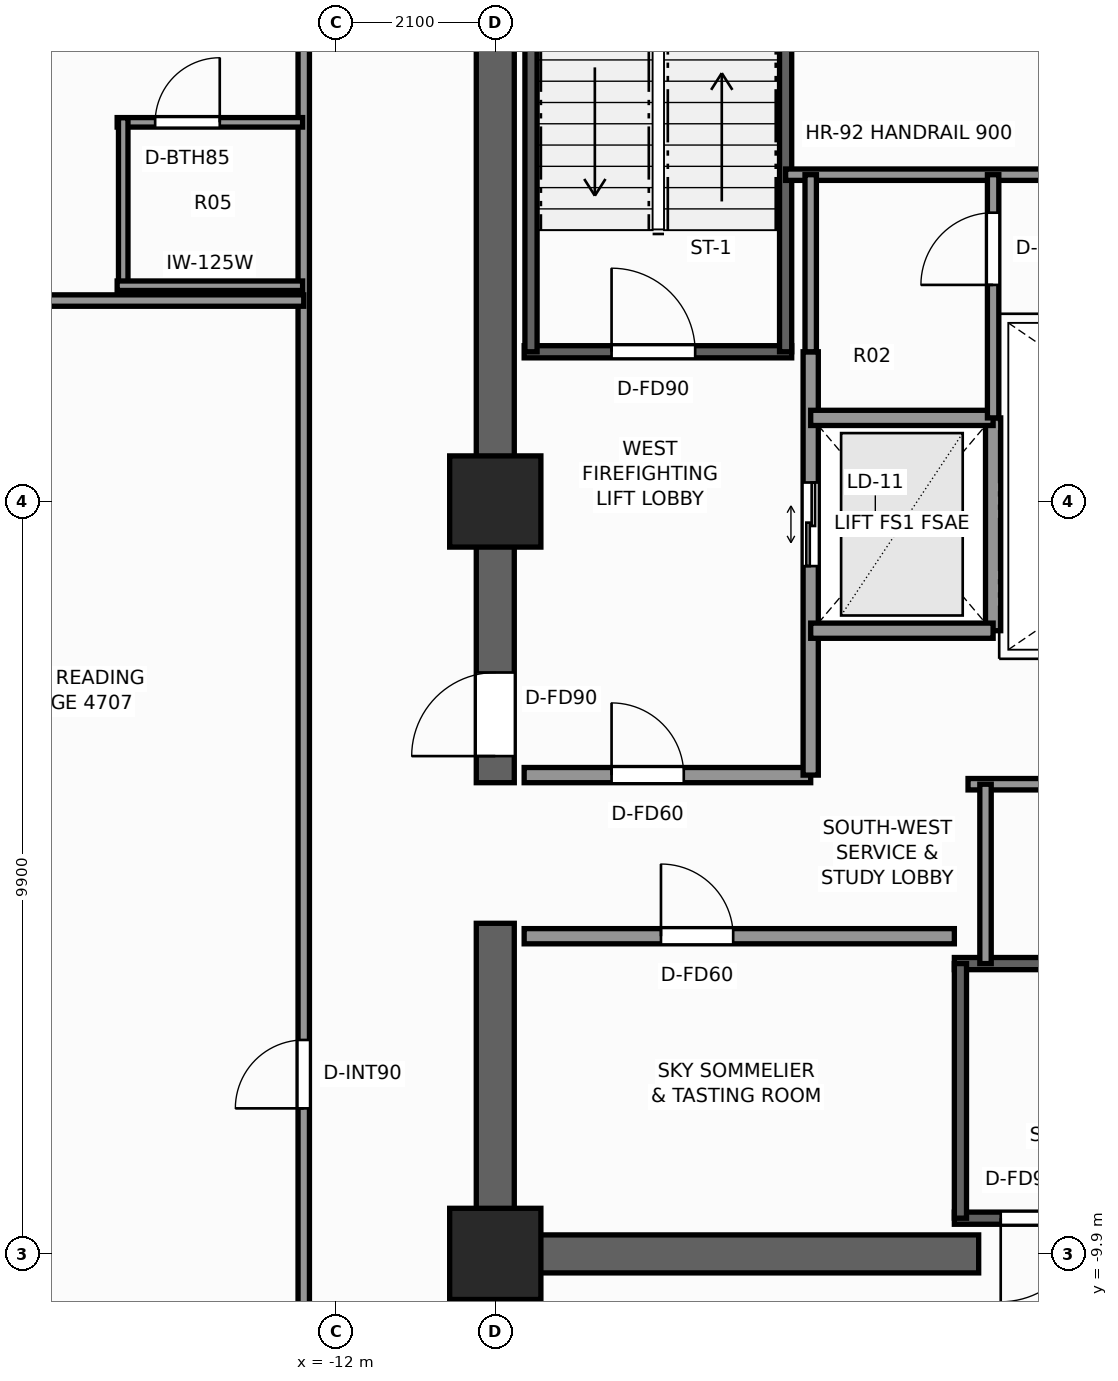
"""IFC4 building model, lengths in metres.
Left out: names, types, materials, properties, quantities, classifications, styles, units other than length and angle.
Written with IfcOpenShell. Run it as: python <this file> out.ifc"""

import sys

from ifc_helpers import new_model, si_unit, direction, frame, frame_2d, origin, origin_2d, place, context, subcontext, project, spatial, rectangle, extrude, element, fill, save


model = new_model("IFC4")
c1 = context("Model", 3, precision=1e-05, world=origin(), true_north=direction((0.0, 1.0)))
c2 = subcontext(c1, "Body", "Model", "MODEL_VIEW")
j1 = project(units=[si_unit("LENGTHUNIT", "METRE"), si_unit("PLANEANGLEUNIT", "RADIAN")], contexts=[c1])
p1 = place(None, origin())
s1 = spatial("IfcSite", under=j1, at=p1, CompositionType="ELEMENT")
p2 = place(p1, origin())
s2 = spatial("IfcBuilding", under=s1, at=p2, CompositionType="ELEMENT")
p3 = place(p2, frame((0.0, 0.0, 163.5)))
s3 = spatial("IfcBuildingStorey", under=s2, at=p3, CompositionType="ELEMENT", Elevation=163.5)
p4 = place(p3, frame((-3.54, -9.9, 0.0), z_axis=(0.0, 0.0, 1.0), x_axis=(-1.0, 0.0, 0.0)))
e1 = element("IfcWall", 1, at=p4, inside=s3, PredefinedType="SHEAR", context=c2, shape_type="SweptSolid", body=[
    extrude(rectangle(XDim=6.61, YDim=0.5, at=frame_2d((3.305, 0.0))), origin(), (0.0, 0.0, 1.0), 3.3),
])
p5 = place(p3, frame((-9.9, -9.65, 0.0), z_axis=(0.0, 0.0, 1.0), x_axis=(0.0, 1.0, 0.0)))
e2 = element("IfcWall", 2, at=p5, inside=s3, PredefinedType="SHEAR", context=c2, shape_type="SweptSolid", body=[
    extrude(rectangle(XDim=4.1, YDim=0.5, at=frame_2d((2.05, 0.0))), origin(), (0.0, 0.0, 1.0), 3.3),
])
p6 = place(p3, frame((-9.9, -3.7, 0.0), z_axis=(0.0, 0.0, 1.0), x_axis=(0.0, 1.0, 0.0)))
e3 = element("IfcWall", 3, at=p6, inside=s3, PredefinedType="SHEAR", context=c2, shape_type="SweptSolid", body=[
    extrude(rectangle(XDim=13.35, YDim=0.5, at=frame_2d((6.675, 0.0))), origin(), (0.0, 0.0, 1.0), 3.3),
])
p7 = place(p6, frame((0.35, 0.0, 0.0)))
e4 = element("IfcOpeningElement", 4, at=p7, cuts=e3, PredefinedType="OPENING", context=c2, shape_type="SweptSolid", body=[
    extrude(rectangle(XDim=1.1, YDim=2.2, at=frame_2d((0.55, 1.1))), frame((0.0, 0.26, 0.0), z_axis=(0.0, -1.0, 0.0), x_axis=(1.0, 0.0, 0.0)), (0.0, 0.0, 1.0), 0.52),
])
for number, where, z_axis, x_axis in (
    (5, (-9.9, -9.9, 0.0), (0.0, 0.0, 1.0), (1.0, 0.0, 0.0)),
    (6, (-9.9, 0.0, 0.0), (0.0, 0.0, 1.0), (1.0, 0.0, 0.0)),
):
    element("IfcColumn", number, at=place(p3, frame(where, z_axis=z_axis, x_axis=x_axis)), inside=s3, PredefinedType="COLUMN", context=c2, shape_type="SweptSolid", body=[
        extrude(rectangle(XDim=1.2, YDim=1.2, at=origin_2d()), origin(), (0.0, 0.0, 1.0), 3.3),
    ])
p8 = place(p3, frame((-9.52, 1.97, 0.0), z_axis=(0.0, 0.0, 1.0), x_axis=(1.0, 0.0, 0.0)))
e7 = element("IfcWall", 7, at=p8, inside=s3, PredefinedType="SHEAR", context=c2, shape_type="SweptSolid", body=[
    extrude(rectangle(XDim=3.52, YDim=0.16, at=frame_2d((1.76, 0.0))), origin(), (0.0, 0.0, 1.0), 3.3),
])
p9 = place(p8, frame((1.15, 0.0, 0.0)))
e8 = element("IfcOpeningElement", 8, at=p9, cuts=e7, PredefinedType="OPENING", context=c2, shape_type="SweptSolid", body=[
    extrude(rectangle(XDim=1.1, YDim=2.2, at=frame_2d((0.55, 1.1))), frame((0.0, 0.09, 0.0), z_axis=(0.0, -1.0, 0.0), x_axis=(1.0, 0.0, 0.0)), (0.0, 0.0, 1.0), 0.18),
])
for number, where, z_axis, x_axis in (
    (9, (-9.43, 1.97, 0.0), (0.0, 0.0, 1.0), (0.0, 1.0, 0.0)),
    (10, (-6.08, 1.97, 0.0), (0.0, 0.0, 1.0), (0.0, 1.0, 0.0)),
):
    element("IfcWall", number, at=place(p3, frame(where, z_axis=z_axis, x_axis=x_axis)), inside=s3, PredefinedType="SHEAR", context=c2, shape_type="SweptSolid", body=[
        extrude(rectangle(XDim=7.56, YDim=0.16, at=frame_2d((3.78, 0.0))), origin(), (0.0, 0.0, 1.0), 3.3),
    ])
p10 = place(p3, frame((3.86, -9.43, 0.0), z_axis=(0.0, 0.0, 1.0), x_axis=(-1.0, 0.0, 0.0)))
e11 = element("IfcWall", 11, at=p10, inside=s3, PredefinedType="SHEAR", context=c2, shape_type="SweptSolid", body=[
    extrude(rectangle(XDim=7.72, YDim=0.16, at=frame_2d((3.86, 0.0))), origin(), (0.0, 0.0, 1.0), 3.3),
])
p11 = place(p10, frame((6.01, 0.0, 0.0)))
e12 = element("IfcOpeningElement", 12, at=p11, cuts=e11, PredefinedType="OPENING", context=c2, shape_type="SweptSolid", body=[
    extrude(rectangle(XDim=1.1, YDim=2.2, at=frame_2d((0.55, 1.1))), frame((0.0, 0.09, 0.0), z_axis=(0.0, -1.0, 0.0), x_axis=(1.0, 0.0, 0.0)), (0.0, 0.0, 1.0), 0.18),
])
p12 = place(p3, frame((-3.86, -6.08, 0.0), z_axis=(0.0, 0.0, 1.0), x_axis=(1.0, 0.0, 0.0)))
e13 = element("IfcWall", 13, at=p12, inside=s3, PredefinedType="SHEAR", context=c2, shape_type="SweptSolid", body=[
    extrude(rectangle(XDim=7.72, YDim=0.16, at=frame_2d((3.86, 0.0))), origin(), (0.0, 0.0, 1.0), 3.3),
])
p13 = place(p3, frame((-3.78, -9.43, 0.0), z_axis=(0.0, 0.0, 1.0), x_axis=(0.0, 1.0, 0.0)))
e14 = element("IfcWall", 14, at=p13, inside=s3, PredefinedType="SHEAR", context=c2, shape_type="SweptSolid", body=[
    extrude(rectangle(XDim=3.35, YDim=0.16, at=frame_2d((1.675, 0.0))), origin(), (0.0, 0.0, 1.0), 3.3),
])
p14 = place(p3, frame((-9.52, -3.6, 0.0), z_axis=(0.0, 0.0, 1.0), x_axis=(1.0, 0.0, 0.0)))
e15 = element("IfcWall", 15, at=p14, inside=s3, PredefinedType="SOLIDWALL", context=c2, shape_type="SweptSolid", body=[
    extrude(rectangle(XDim=3.77, YDim=0.2, at=frame_2d((1.885, 0.0))), origin(), (0.0, 0.0, 1.0), 3.1),
])
p15 = place(p14, frame((1.15, 0.0, 0.0)))
e16 = element("IfcOpeningElement", 16, at=p15, cuts=e15, PredefinedType="OPENING", context=c2, shape_type="SweptSolid", body=[
    extrude(rectangle(XDim=0.95, YDim=2.06, at=frame_2d((0.475, 1.03))), frame((0.0, 0.11, 0.0), z_axis=(0.0, -1.0, 0.0), x_axis=(1.0, 0.0, 0.0)), (0.0, 0.0, 1.0), 0.22),
])
p16 = place(p3, frame((-5.75, -3.6, 0.0), z_axis=(0.0, 0.0, 1.0), x_axis=(0.0, 1.0, 0.0)))
e17 = element("IfcWall", 17, at=p16, inside=s3, PredefinedType="SOLIDWALL", context=c2, shape_type="SweptSolid", body=[
    extrude(rectangle(XDim=5.57, YDim=0.2, at=frame_2d((2.785, 0.0))), origin(), (0.0, 0.0, 1.0), 2.735),
])
p17 = place(p16, frame((2.75, 0.0, 0.0)))
e18 = element("IfcOpeningElement", 18, at=p17, cuts=e17, PredefinedType="OPENING", context=c2, shape_type="SweptSolid", body=[
    extrude(rectangle(XDim=1.1, YDim=2.2, at=frame_2d((0.55, 1.1))), frame((0.0, 0.11, 0.0), z_axis=(0.0, -1.0, 0.0), x_axis=(1.0, 0.0, 0.0)), (0.0, 0.0, 1.0), 0.22),
])
p18 = place(p3, frame((-3.35, -1.7, 0.0), z_axis=(0.0, 0.0, 1.0), x_axis=(0.0, 1.0, 0.0)))
e19 = element("IfcWall", 19, at=p18, inside=s3, PredefinedType="SOLIDWALL", context=c2, shape_type="SweptSolid", body=[
    extrude(rectangle(XDim=2.8, YDim=0.2, at=frame_2d((1.4, 0.0))), origin(), (0.0, 0.0, 1.0), 2.735),
])
for number, where, z_axis, x_axis in (
    (20, (-5.75, -1.7, 0.0), (0.0, 0.0, 1.0), (1.0, 0.0, 0.0)),
    (21, (-5.75, 1.1, 0.0), (0.0, 0.0, 1.0), (1.0, 0.0, 0.0)),
):
    element("IfcWall", number, at=place(p3, frame(where, z_axis=z_axis, x_axis=x_axis)), inside=s3, PredefinedType="SOLIDWALL", context=c2, shape_type="SweptSolid", body=[
        extrude(rectangle(XDim=2.4, YDim=0.2, at=frame_2d((1.2, 0.0))), origin(), (0.0, 0.0, 1.0), 3.1),
    ])
p19 = place(p3, frame((-6.08, 4.3, 0.0), z_axis=(0.0, 0.0, 1.0), x_axis=(1.0, 0.0, 0.0)))
e22 = element("IfcWall", 22, at=p19, inside=s3, PredefinedType="PARTITIONING", context=c2, shape_type="SweptSolid", body=[
    extrude(rectangle(XDim=6.3, YDim=0.15, at=frame_2d((3.15, 0.0))), origin(), (0.0, 0.0, 1.0), 3.1),
])
p20 = place(p3, frame((-9.52, -5.72, 0.0), z_axis=(0.0, 0.0, 1.0), x_axis=(1.0, 0.0, 0.0)))
e23 = element("IfcWall", 23, at=p20, inside=s3, PredefinedType="SOLIDWALL", context=c2, shape_type="SweptSolid", body=[
    extrude(rectangle(XDim=5.66, YDim=0.2, at=frame_2d((2.83, 0.0))), origin(), (0.0, 0.0, 1.0), 3.1),
])
p21 = place(p20, frame((1.8, 0.0, 0.0)))
e24 = element("IfcOpeningElement", 24, at=p21, cuts=e23, PredefinedType="OPENING", context=c2, shape_type="SweptSolid", body=[
    extrude(rectangle(XDim=0.95, YDim=2.06, at=frame_2d((0.475, 1.03))), frame((0.0, 0.11, 0.0), z_axis=(0.0, -1.0, 0.0), x_axis=(1.0, 0.0, 0.0)), (0.0, 0.0, 1.0), 0.22),
])
p22 = place(p3, frame((-3.68, -3.72, 0.0), z_axis=(0.0, 0.0, 1.0), x_axis=(1.0, 0.0, 0.0)))
e25 = element("IfcWall", 25, at=p22, inside=s3, PredefinedType="PARTITIONING", context=c2, shape_type="SweptSolid", body=[
    extrude(rectangle(XDim=7.36, YDim=0.15, at=frame_2d((3.68, 0.0))), origin(), (0.0, 0.0, 1.0), 3.1),
])
p23 = place(p3, frame((-3.45, -6.08, 0.0), z_axis=(0.0, 0.0, 1.0), x_axis=(0.0, 1.0, 0.0)))
e26 = element("IfcWall", 26, at=p23, inside=s3, PredefinedType="PARTITIONING", context=c2, shape_type="SweptSolid", body=[
    extrude(rectangle(XDim=2.36, YDim=0.15, at=frame_2d((1.18, 0.0))), origin(), (0.0, 0.0, 1.0), 3.1),
])
p24 = place(p3, frame((-3.35, 1.1, 0.0), z_axis=(0.0, 0.0, 1.0), x_axis=(0.0, 1.0, 0.0)))
e27 = element("IfcWall", 27, at=p24, inside=s3, PredefinedType="PARTITIONING", context=c2, shape_type="SweptSolid", body=[
    extrude(rectangle(XDim=3.2, YDim=0.15, at=frame_2d((1.6, 0.0))), origin(), (0.0, 0.0, 1.0), 2.735),
])
p25 = place(p24, frame((1.75, 0.0, 0.0)))
e28 = element("IfcOpeningElement", 28, at=p25, cuts=e27, PredefinedType="OPENING", context=c2, shape_type="SweptSolid", body=[
    extrude(rectangle(XDim=0.95, YDim=2.06, at=frame_2d((0.475, 1.03))), frame((0.0, 0.085, 0.0), z_axis=(0.0, -1.0, 0.0), x_axis=(1.0, 0.0, 0.0)), (0.0, 0.0, 1.0), 0.17),
])
p26 = place(p3, frame((-5.75, 1.97, 0.0), z_axis=(0.0, 0.0, 1.0), x_axis=(0.0, 1.0, 0.0)))
e29 = element("IfcWall", 29, at=p26, inside=s3, PredefinedType="PARTITIONING", context=c2, shape_type="SweptSolid", body=[
    extrude(rectangle(XDim=2.33, YDim=0.15, at=frame_2d((1.165, 0.0))), origin(), (0.0, 0.0, 1.0), 2.735),
])
p27 = place(p3, frame((-12.42, -12.58, 0.0), z_axis=(0.0, 0.0, 1.0), x_axis=(0.0, 1.0, 0.0)))
e30 = element("IfcWall", 30, at=p27, inside=s3, PredefinedType="PARTITIONING", context=c2, shape_type="SweptSolid", body=[
    extrude(rectangle(XDim=24.84, YDim=0.15, at=frame_2d((12.42, 0.0))), origin(), (0.0, 0.0, 1.0), 2.389),
])
p28 = place(p27, frame((4.595, 0.0, 0.0)))
e31 = element("IfcOpeningElement", 31, at=p28, cuts=e30, PredefinedType="OPENING", context=c2, shape_type="SweptSolid", body=[
    extrude(rectangle(XDim=0.9, YDim=2.06, at=frame_2d((0.45, 1.03))), frame((0.0, 0.085, 0.0), z_axis=(0.0, -1.0, 0.0), x_axis=(1.0, 0.0, 0.0)), (0.0, 0.0, 1.0), 0.17),
])
p29 = place(p27, frame((19.64, 0.0, 0.0)))
e32 = element("IfcOpeningElement", 32, at=p29, cuts=e30, PredefinedType="OPENING", context=c2, shape_type="SweptSolid", body=[
    extrude(rectangle(XDim=0.95, YDim=2.06, at=frame_2d((0.475, 1.03))), frame((0.0, 0.085, 0.0), z_axis=(0.0, -1.0, 0.0), x_axis=(1.0, 0.0, 0.0)), (0.0, 0.0, 1.0), 0.17),
])
p30 = place(p3, frame((-19.08, 2.644, 0.0), z_axis=(0.0, 0.0, 1.0), x_axis=(1.0, 0.0, 0.0)))
e33 = element("IfcWall", 33, at=p30, inside=s3, PredefinedType="PARTITIONING", context=c2, shape_type="SweptSolid", body=[
    extrude(rectangle(XDim=6.66, YDim=0.15, at=frame_2d((3.33, 0.0))), origin(), (0.0, 0.0, 1.0), 2.473),
])
p31 = place(p3, frame((-14.875, 4.989, 0.0), z_axis=(0.0, 0.0, 1.0), x_axis=(1.0, 0.0, 0.0)))
e34 = element("IfcWall", 34, at=p31, inside=s3, PredefinedType="PARTITIONING", context=c2, shape_type="SweptSolid", body=[
    extrude(rectangle(XDim=2.44, YDim=0.125, at=frame_2d((1.22, 0.0))), origin(), (0.0, 0.0, 1.0), 3.1),
])
p32 = place(p31, frame((0.5, 0.0, 0.0)))
e35 = element("IfcOpeningElement", 35, at=p32, cuts=e34, PredefinedType="OPENING", context=c2, shape_type="SweptSolid", body=[
    extrude(rectangle(XDim=0.85, YDim=2.03, at=frame_2d((0.425, 1.015))), frame((0.0, 0.073, 0.0), z_axis=(0.0, -1.0, 0.0), x_axis=(1.0, 0.0, 0.0)), (0.0, 0.0, 1.0), 0.145),
])
p33 = place(p3, frame((-14.795, 2.779, 0.0), z_axis=(0.0, 0.0, 1.0), x_axis=(0.0, 1.0, 0.0)))
e36 = element("IfcWall", 36, at=p33, inside=s3, PredefinedType="PARTITIONING", context=c2, shape_type="SweptSolid", body=[
    extrude(rectangle(XDim=2.27, YDim=0.125, at=frame_2d((1.135, 0.0))), origin(), (0.0, 0.0, 1.0), 2.389),
])
p34 = place(p3, frame((-14.875, 2.839, 0.0), z_axis=(0.0, 0.0, 1.0), x_axis=(1.0, 0.0, 0.0)))
e37 = element("IfcWall", 37, at=p34, inside=s3, PredefinedType="PARTITIONING", context=c2, shape_type="SweptSolid", body=[
    extrude(rectangle(XDim=2.44, YDim=0.125, at=frame_2d((1.22, 0.0))), origin(), (0.0, 0.0, 1.0), 3.1),
])
p35 = place(p9, origin())
e38 = element("IfcDoor", 38, at=p35, inside=s3, OperationType="SINGLE_SWING_LEFT", PredefinedType="DOOR", context=c2, shape_type="SweptSolid", body=[
    extrude(rectangle(XDim=1.1, YDim=2.2, at=frame_2d((0.55, 1.1))), frame((0.0, 0.025, 0.0), z_axis=(0.0, -1.0, 0.0), x_axis=(1.0, 0.0, 0.0)), (0.0, 0.0, 1.0), 0.05),
])
fill(e8, e38)
p36 = place(p11, origin())
e39 = element("IfcDoor", 39, at=p36, inside=s3, OperationType="SINGLE_SWING_RIGHT", PredefinedType="DOOR", context=c2, shape_type="SweptSolid", body=[
    extrude(rectangle(XDim=1.1, YDim=2.2, at=frame_2d((0.55, 1.1))), frame((0.0, 0.025, 0.0), z_axis=(0.0, -1.0, 0.0), x_axis=(1.0, 0.0, 0.0)), (0.0, 0.0, 1.0), 0.05),
])
fill(e12, e39)
p37 = place(p7, origin())
e40 = element("IfcDoor", 40, at=p37, inside=s3, OperationType="SINGLE_SWING_LEFT", PredefinedType="DOOR", context=c2, shape_type="SweptSolid", body=[
    extrude(rectangle(XDim=1.1, YDim=2.2, at=frame_2d((0.55, 1.1))), frame((0.0, 0.025, 0.0), z_axis=(0.0, -1.0, 0.0), x_axis=(1.0, 0.0, 0.0)), (0.0, 0.0, 1.0), 0.05),
])
fill(e4, e40)
p38 = place(p17, origin())
e41 = element("IfcDoor", 41, at=p38, inside=s3, OperationType="DOUBLE_DOOR_SLIDING", PredefinedType="DOOR", context=c2, shape_type="SweptSolid", body=[
    extrude(rectangle(XDim=1.1, YDim=2.2, at=frame_2d((0.55, 1.1))), frame((0.0, 0.025, 0.0), z_axis=(0.0, -1.0, 0.0), x_axis=(1.0, 0.0, 0.0)), (0.0, 0.0, 1.0), 0.05),
])
fill(e18, e41)
p39 = place(p21, origin())
e42 = element("IfcDoor", 42, at=p39, inside=s3, OperationType="SINGLE_SWING_LEFT", PredefinedType="DOOR", context=c2, shape_type="SweptSolid", body=[
    extrude(rectangle(XDim=0.95, YDim=2.06, at=frame_2d((0.475, 1.03))), frame((0.0, 0.025, 0.0), z_axis=(0.0, -1.0, 0.0), x_axis=(1.0, 0.0, 0.0)), (0.0, 0.0, 1.0), 0.05),
])
fill(e24, e42)
p40 = place(p15, origin())
e43 = element("IfcDoor", 43, at=p40, inside=s3, OperationType="SINGLE_SWING_LEFT", PredefinedType="DOOR", context=c2, shape_type="SweptSolid", body=[
    extrude(rectangle(XDim=0.95, YDim=2.06, at=frame_2d((0.475, 1.03))), frame((0.0, 0.025, 0.0), z_axis=(0.0, -1.0, 0.0), x_axis=(1.0, 0.0, 0.0)), (0.0, 0.0, 1.0), 0.05),
])
fill(e16, e43)
p41 = place(p25, origin())
e44 = element("IfcDoor", 44, at=p41, inside=s3, OperationType="SINGLE_SWING_LEFT", PredefinedType="DOOR", context=c2, shape_type="SweptSolid", body=[
    extrude(rectangle(XDim=0.95, YDim=2.06, at=frame_2d((0.475, 1.03))), frame((0.0, 0.025, 0.0), z_axis=(0.0, -1.0, 0.0), x_axis=(1.0, 0.0, 0.0)), (0.0, 0.0, 1.0), 0.05),
])
fill(e28, e44)
p42 = place(p28, origin())
e45 = element("IfcDoor", 45, at=p42, inside=s3, OperationType="SINGLE_SWING_LEFT", PredefinedType="DOOR", context=c2, shape_type="SweptSolid", body=[
    extrude(rectangle(XDim=0.9, YDim=2.06, at=frame_2d((0.45, 1.03))), frame((0.0, 0.025, 0.0), z_axis=(0.0, -1.0, 0.0), x_axis=(1.0, 0.0, 0.0)), (0.0, 0.0, 1.0), 0.05),
])
fill(e31, e45)
p43 = place(p32, origin())
e46 = element("IfcDoor", 46, at=p43, inside=s3, OperationType="SINGLE_SWING_RIGHT", PredefinedType="DOOR", context=c2, shape_type="SweptSolid", body=[
    extrude(rectangle(XDim=0.85, YDim=2.03, at=frame_2d((0.425, 1.015))), frame((0.0, 0.025, 0.0), z_axis=(0.0, -1.0, 0.0), x_axis=(1.0, 0.0, 0.0)), (0.0, 0.0, 1.0), 0.05),
])
fill(e35, e46)
save(model, sys.argv[1])
